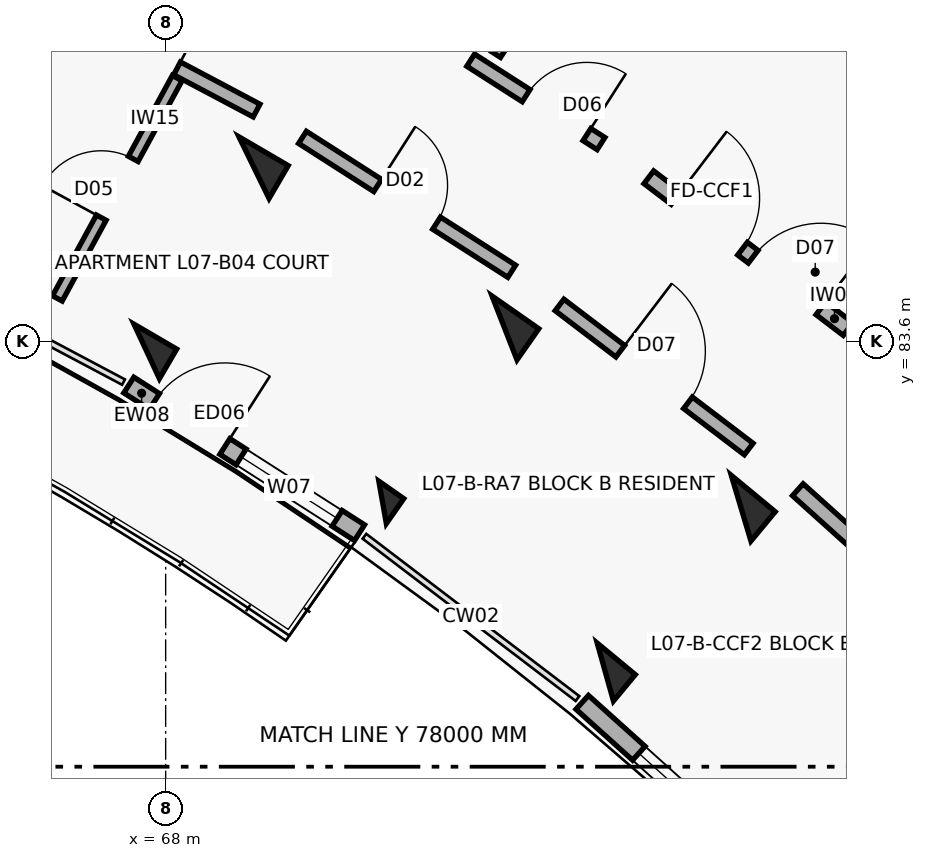
"""IFC4 building model, lengths in metres.
Left out: names, types, materials, properties, quantities, classifications, styles, units other than length and angle.
Written with IfcOpenShell. Run it as: python <this file> out.ifc"""

import sys

from ifc_helpers import new_model, si_unit, direction, frame, frame_2d, origin, origin_2d, place, context, subcontext, project, spatial, rectangle, extrude, element, fill, save


model = new_model("IFC4")
c1 = context("Model", 3, precision=1e-05, world=origin(), true_north=direction((0.0, 1.0)))
c2 = subcontext(c1, "Body", "Model", "MODEL_VIEW")
j1 = project(units=[si_unit("LENGTHUNIT", "METRE"), si_unit("PLANEANGLEUNIT", "RADIAN")], contexts=[c1])
p1 = place(None, origin())
s1 = spatial("IfcSite", under=j1, at=p1, CompositionType="ELEMENT")
p2 = place(p1, origin())
s2 = spatial("IfcBuilding", under=s1, at=p2, CompositionType="ELEMENT")
p3 = place(p2, frame((0.0, 0.0, 23.6)))
s3 = spatial("IfcBuildingStorey", under=s2, at=p3, CompositionType="ELEMENT", Elevation=23.6)
p4 = place(p3, frame((67.751, 83.464, 0.0), z_axis=(0.0, 0.0, 1.0), x_axis=(0.504226211181, 0.863571611366, 0.0)))
e1 = element("IfcColumn", 1, at=p4, inside=s3, PredefinedType="COLUMN", context=c2, shape_type="SweptSolid", body=[
    extrude(rectangle(XDim=0.45, YDim=0.65, at=origin_2d()), origin(), (0.0, 0.0, 1.0), 3.1),
])
p5 = place(p3, frame((69.163, 85.882, 0.0), z_axis=(0.0, 0.0, 1.0), x_axis=(0.504226211181, 0.863571611366, 0.0)))
e2 = element("IfcColumn", 2, at=p5, inside=s3, PredefinedType="COLUMN", context=c2, shape_type="SweptSolid", body=[
    extrude(rectangle(XDim=0.5, YDim=0.75, at=origin_2d()), origin(), (0.0, 0.0, 1.0), 3.1),
])
p6 = place(p3, frame((70.854, 81.478, 0.0), z_axis=(0.0, 0.0, 1.0), x_axis=(0.573004420611, 0.819552276527, 0.0)))
e3 = element("IfcColumn", 3, at=p6, inside=s3, PredefinedType="COLUMN", context=c2, shape_type="SweptSolid", body=[
    extrude(rectangle(XDim=0.4, YDim=0.4, at=origin_2d()), origin(), (0.0, 0.0, 1.0), 3.1),
])
p7 = place(p3, frame((72.458, 83.773, 0.0), z_axis=(0.0, 0.0, 1.0), x_axis=(0.573004420611, 0.819552276527, 0.0)))
e4 = element("IfcColumn", 4, at=p7, inside=s3, PredefinedType="COLUMN", context=c2, shape_type="SweptSolid", body=[
    extrude(rectangle(XDim=0.5, YDim=0.75, at=origin_2d()), origin(), (0.0, 0.0, 1.0), 3.1),
])
p8 = place(p3, frame((73.785, 79.245, 0.0), z_axis=(0.0, 0.0, 1.0), x_axis=(0.637961754089, 0.770068049148, 0.0)))
e5 = element("IfcColumn", 5, at=p8, inside=s3, PredefinedType="COLUMN", context=c2, shape_type="SweptSolid", body=[
    extrude(rectangle(XDim=0.45, YDim=0.65, at=origin_2d()), origin(), (0.0, 0.0, 1.0), 3.1),
])
p9 = place(p3, frame((75.571, 81.402, 0.0), z_axis=(0.0, 0.0, 1.0), x_axis=(0.637961754089, 0.770068049148, 0.0)))
e6 = element("IfcColumn", 6, at=p9, inside=s3, PredefinedType="COLUMN", context=c2, shape_type="SweptSolid", body=[
    extrude(rectangle(XDim=0.5, YDim=0.75, at=origin_2d()), origin(), (0.0, 0.0, 1.0), 3.1),
])
p10 = place(p3, frame((67.515, 83.022, 0.0), z_axis=(0.0, 0.0, 1.0), x_axis=(0.84225540507, -0.539078688718, 0.0)))
e7 = element("IfcWall", 7, at=p10, inside=s3, PredefinedType="SOLIDWALL", context=c2, shape_type="SweptSolid", body=[
    extrude(rectangle(XDim=3.604, YDim=0.245, at=frame_2d((1.802, 0.0))), origin(), (0.0, 0.0, 1.0), 2.25),
])
p11 = place(p10, frame((0.4, 0.0, 0.0)))
e8 = element("IfcOpeningElement", 8, at=p11, cuts=e7, PredefinedType="OPENING", context=c2, shape_type="SweptSolid", body=[
    extrude(rectangle(XDim=1.1, YDim=2.15, at=frame_2d((0.55, 1.075))), frame((0.0, 0.133, 0.0), z_axis=(0.0, -1.0, 0.0), x_axis=(1.0, 0.0, 0.0)), (0.0, 0.0, 1.0), 0.265),
])
p12 = place(p10, frame((1.754, 0.0, 0.35)))
e9 = element("IfcOpeningElement", 9, at=p12, cuts=e7, PredefinedType="OPENING", context=c2, shape_type="SweptSolid", body=[
    extrude(rectangle(XDim=1.5, YDim=1.65, at=frame_2d((0.75, 0.825))), frame((0.0, 0.133, 0.0), z_axis=(0.0, -1.0, 0.0), x_axis=(1.0, 0.0, 0.0)), (0.0, 0.0, 1.0), 0.265),
])
p13 = place(p3, frame((73.481, 78.847, 0.0), z_axis=(0.0, 0.0, 1.0), x_axis=(0.743385092197, -0.668863666751, 0.0)))
e10 = element("IfcWall", 10, at=p13, inside=s3, PredefinedType="SOLIDWALL", context=c2, shape_type="SweptSolid", body=[
    extrude(rectangle(XDim=3.604, YDim=0.245, at=frame_2d((1.802, 0.0))), origin(), (0.0, 0.0, 1.0), 2.25),
])
p14 = place(p13, frame((1.002, 0.0, 0.32)))
e11 = element("IfcOpeningElement", 11, at=p14, cuts=e10, PredefinedType="OPENING", context=c2, shape_type="SweptSolid", body=[
    extrude(rectangle(XDim=1.6, YDim=1.5, at=frame_2d((0.8, 0.75))), frame((0.0, 0.133, 0.0), z_axis=(0.0, -1.0, 0.0), x_axis=(1.0, 0.0, 0.0)), (0.0, 0.0, 1.0), 0.265),
])
p15 = place(p3, frame((66.309, 88.165, 0.0), z_axis=(0.0, 0.0, 1.0), x_axis=(0.883444301944, -0.468536194293, 0.0)))
e12 = element("IfcWall", 12, at=p15, inside=s3, PredefinedType="SOLIDWALL", context=c2, shape_type="SweptSolid", body=[
    extrude(rectangle(XDim=3.269, YDim=0.19, at=frame_2d((1.634, 0.0))), origin(), (0.0, 0.0, 1.0), 2.08),
])
p16 = place(p15, frame((1.184, 0.0, 0.0)))
e13 = element("IfcOpeningElement", 13, at=p16, cuts=e12, PredefinedType="OPENING", context=c2, shape_type="SweptSolid", body=[
    extrude(rectangle(XDim=0.9, YDim=2.1, at=frame_2d((0.45, 1.05))), frame((0.0, 0.105, 0.0), z_axis=(0.0, -1.0, 0.0), x_axis=(1.0, 0.0, 0.0)), (0.0, 0.0, 1.0), 0.21),
])
p17 = place(p3, frame((66.575, 84.162, 0.0), z_axis=(0.0, 0.0, 1.0), x_axis=(0.477841058477, 0.878446311868, 0.0)))
e14 = element("IfcWall", 14, at=p17, inside=s3, PredefinedType="PARTITIONING", context=c2, shape_type="SweptSolid", body=[
    extrude(rectangle(XDim=3.3, YDim=0.145, at=frame_2d((1.65, 0.0))), origin(), (0.0, 0.0, 1.0), 2.08),
])
p18 = place(p17, frame((1.21, 0.0, 0.0)))
e15 = element("IfcOpeningElement", 15, at=p18, cuts=e14, PredefinedType="OPENING", context=c2, shape_type="SweptSolid", body=[
    extrude(rectangle(XDim=0.88, YDim=2.1, at=frame_2d((0.44, 1.05))), frame((0.0, 0.083, 0.0), z_axis=(0.0, -1.0, 0.0), x_axis=(1.0, 0.0, 0.0)), (0.0, 0.0, 1.0), 0.165),
])
p19 = place(p3, frame((70.834, 88.051, 0.0), z_axis=(0.0, 0.0, 1.0), x_axis=(0.842257205985, -0.539075874963, 0.0)))
e16 = element("IfcWall", 16, at=p19, inside=s3, PredefinedType="SOLIDWALL", context=c2, shape_type="SweptSolid", body=[
    extrude(rectangle(XDim=3.436, YDim=0.19, at=frame_2d((1.718, 0.0))), origin(), (0.0, 0.0, 1.0), 2.08),
])
p20 = place(p19, frame((0.28, 0.0, 0.0)))
e17 = element("IfcOpeningElement", 17, at=p20, cuts=e16, PredefinedType="OPENING", context=c2, shape_type="SweptSolid", body=[
    extrude(rectangle(XDim=1.12, YDim=2.15, at=frame_2d((0.56, 1.075))), frame((0.0, 0.105, 0.0), z_axis=(0.0, -1.0, 0.0), x_axis=(1.0, 0.0, 0.0)), (0.0, 0.0, 1.0), 0.21),
])
p21 = place(p19, frame((2.266, 0.0, 0.0)))
e18 = element("IfcOpeningElement", 18, at=p21, cuts=e16, PredefinedType="OPENING", context=c2, shape_type="SweptSolid", body=[
    extrude(rectangle(XDim=0.95, YDim=2.1, at=frame_2d((0.475, 1.05))), frame((0.0, 0.105, 0.0), z_axis=(0.0, -1.0, 0.0), x_axis=(1.0, 0.0, 0.0)), (0.0, 0.0, 1.0), 0.21),
])
p22 = place(p3, frame((69.8, 86.281, 0.0), z_axis=(0.0, 0.0, 1.0), x_axis=(0.842225276846, -0.539125758095, 0.0)))
e19 = element("IfcWall", 19, at=p22, inside=s3, PredefinedType="SOLIDWALL", context=c2, shape_type="SweptSolid", body=[
    extrude(rectangle(XDim=3.269, YDim=0.19, at=frame_2d((1.634, 0.0))), origin(), (0.0, 0.0, 1.0), 2.08),
])
p23 = place(p22, frame((1.174, 0.0, 0.0)))
e20 = element("IfcOpeningElement", 20, at=p23, cuts=e19, PredefinedType="OPENING", context=c2, shape_type="SweptSolid", body=[
    extrude(rectangle(XDim=0.92, YDim=2.1, at=frame_2d((0.46, 1.05))), frame((0.0, 0.105, 0.0), z_axis=(0.0, -1.0, 0.0), x_axis=(1.0, 0.0, 0.0)), (0.0, 0.0, 1.0), 0.21),
])
p24 = place(p3, frame((72.347, 87.37, 0.0), z_axis=(0.0, 0.0, 1.0), x_axis=(0.537777309481, 0.843086926365, 0.0)))
e21 = element("IfcWall", 21, at=p24, inside=s3, PredefinedType="PARTITIONING", context=c2, shape_type="SweptSolid", body=[
    extrude(rectangle(XDim=7.95, YDim=0.14, at=frame_2d((3.975, 0.0))), origin(), (0.0, 0.0, 1.0), 2.08),
])
p25 = place(p24, frame((6.05, 0.0, 0.0)))
e22 = element("IfcOpeningElement", 22, at=p25, cuts=e21, PredefinedType="OPENING", context=c2, shape_type="SweptSolid", body=[
    extrude(rectangle(XDim=0.92, YDim=2.1, at=frame_2d((0.46, 1.05))), frame((0.0, 0.08, 0.0), z_axis=(0.0, -1.0, 0.0), x_axis=(1.0, 0.0, 0.0)), (0.0, 0.0, 1.0), 0.16),
])
p26 = place(p3, frame((74.357, 85.756, 0.0), z_axis=(0.0, 0.0, 1.0), x_axis=(0.795498026433, -0.605956178235, 0.0)))
e23 = element("IfcWall", 23, at=p26, inside=s3, PredefinedType="SOLIDWALL", context=c2, shape_type="SweptSolid", body=[
    extrude(rectangle(XDim=3.296, YDim=0.21, at=frame_2d((1.648, 0.0))), origin(), (0.0, 0.0, 1.0), 2.08),
])
p27 = place(p26, frame((0.45, 0.0, 0.0)))
e24 = element("IfcOpeningElement", 24, at=p27, cuts=e23, PredefinedType="OPENING", context=c2, shape_type="SweptSolid", body=[
    extrude(rectangle(XDim=1.1, YDim=2.15, at=frame_2d((0.55, 1.075))), frame((0.0, 0.115, 0.0), z_axis=(0.0, -1.0, 0.0), x_axis=(1.0, 0.0, 0.0)), (0.0, 0.0, 1.0), 0.23),
])
p28 = place(p26, frame((1.726, 0.0, 0.0)))
e25 = element("IfcOpeningElement", 25, at=p28, cuts=e23, PredefinedType="OPENING", context=c2, shape_type="SweptSolid", body=[
    extrude(rectangle(XDim=1.12, YDim=2.15, at=frame_2d((0.56, 1.075))), frame((0.0, 0.115, 0.0), z_axis=(0.0, -1.0, 0.0), x_axis=(1.0, 0.0, 0.0)), (0.0, 0.0, 1.0), 0.23),
])
p29 = place(p3, frame((73.182, 84.076, 0.0), z_axis=(0.0, 0.0, 1.0), x_axis=(0.795501577908, -0.605951515838, 0.0)))
e26 = element("IfcWall", 26, at=p29, inside=s3, PredefinedType="SOLIDWALL", context=c2, shape_type="SweptSolid", body=[
    extrude(rectangle(XDim=3.129, YDim=0.19, at=frame_2d((1.564, 0.0))), origin(), (0.0, 0.0, 1.0), 2.08),
])
p30 = place(p29, frame((1.004, 0.0, 0.0)))
e27 = element("IfcOpeningElement", 27, at=p30, cuts=e26, PredefinedType="OPENING", context=c2, shape_type="SweptSolid", body=[
    extrude(rectangle(XDim=1.12, YDim=2.15, at=frame_2d((0.56, 1.075))), frame((0.0, 0.105, 0.0), z_axis=(0.0, -1.0, 0.0), x_axis=(1.0, 0.0, 0.0)), (0.0, 0.0, 1.0), 0.21),
])
p31 = place(p3, frame((76.317, 81.644, 0.0), z_axis=(0.0, 0.0, 1.0), x_axis=(0.743387266925, -0.668861249718, 0.0)))
e28 = element("IfcWall", 28, at=p31, inside=s3, PredefinedType="SOLIDWALL", context=c2, shape_type="SweptSolid", body=[
    extrude(rectangle(XDim=3.128, YDim=0.21, at=frame_2d((1.564, 0.0))), origin(), (0.0, 0.0, 1.0), 2.08),
])
p32 = place(p31, frame((1.014, 0.0, 0.0)))
e29 = element("IfcOpeningElement", 29, at=p32, cuts=e28, PredefinedType="OPENING", context=c2, shape_type="SweptSolid", body=[
    extrude(rectangle(XDim=1.1, YDim=2.15, at=frame_2d((0.55, 1.075))), frame((0.0, 0.115, 0.0), z_axis=(0.0, -1.0, 0.0), x_axis=(1.0, 0.0, 0.0)), (0.0, 0.0, 1.0), 0.23),
])
p33 = place(p11, origin())
e30 = element("IfcDoor", 30, at=p33, inside=s3, OperationType="SINGLE_SWING_RIGHT", PredefinedType="DOOR", context=c2, shape_type="SweptSolid", body=[
    extrude(rectangle(XDim=1.1, YDim=2.15, at=frame_2d((0.55, 1.075))), frame((0.0, 0.025, 0.0), z_axis=(0.0, -1.0, 0.0), x_axis=(1.0, 0.0, 0.0)), (0.0, 0.0, 1.0), 0.05),
])
fill(e8, e30)
p34 = place(p12, origin())
e31 = element("IfcWindow", 31, at=p34, inside=s3, PartitioningType="DOUBLE_PANEL_VERTICAL", PredefinedType="WINDOW", context=c2, shape_type="SweptSolid", body=[
    extrude(rectangle(XDim=1.5, YDim=1.65, at=frame_2d((0.75, 0.825))), frame((0.0, 0.03, 0.0), z_axis=(0.0, -1.0, 0.0), x_axis=(1.0, 0.0, 0.0)), (0.0, 0.0, 1.0), 0.06),
])
fill(e9, e31)
p35 = place(p14, origin())
e32 = element("IfcWindow", 32, at=p35, inside=s3, PartitioningType="DOUBLE_PANEL_VERTICAL", PredefinedType="WINDOW", context=c2, shape_type="SweptSolid", body=[
    extrude(rectangle(XDim=1.6, YDim=1.5, at=frame_2d((0.8, 0.75))), frame((0.0, 0.03, 0.0), z_axis=(0.0, -1.0, 0.0), x_axis=(1.0, 0.0, 0.0)), (0.0, 0.0, 1.0), 0.06),
])
fill(e11, e32)
p36 = place(p16, origin())
e33 = element("IfcDoor", 33, at=p36, inside=s3, OperationType="SINGLE_SWING_RIGHT", PredefinedType="DOOR", context=c2, shape_type="SweptSolid", body=[
    extrude(rectangle(XDim=0.9, YDim=2.1, at=frame_2d((0.45, 1.05))), frame((0.0, 0.025, 0.0), z_axis=(0.0, -1.0, 0.0), x_axis=(1.0, 0.0, 0.0)), (0.0, 0.0, 1.0), 0.05),
])
fill(e13, e33)
p37 = place(p18, origin())
e34 = element("IfcDoor", 34, at=p37, inside=s3, OperationType="SINGLE_SWING_LEFT", PredefinedType="DOOR", context=c2, shape_type="SweptSolid", body=[
    extrude(rectangle(XDim=0.88, YDim=2.1, at=frame_2d((0.44, 1.05))), frame((0.0, 0.025, 0.0), z_axis=(0.0, -1.0, 0.0), x_axis=(1.0, 0.0, 0.0)), (0.0, 0.0, 1.0), 0.05),
])
fill(e15, e34)
p38 = place(p20, origin())
e35 = element("IfcDoor", 35, at=p38, inside=s3, OperationType="SINGLE_SWING_LEFT", PredefinedType="DOOR", context=c2, shape_type="SweptSolid", body=[
    extrude(rectangle(XDim=1.12, YDim=2.15, at=frame_2d((0.56, 1.075))), frame((0.0, 0.025, 0.0), z_axis=(0.0, -1.0, 0.0), x_axis=(1.0, 0.0, 0.0)), (0.0, 0.0, 1.0), 0.05),
])
fill(e17, e35)
p39 = place(p21, origin())
e36 = element("IfcDoor", 36, at=p39, inside=s3, OperationType="SINGLE_SWING_RIGHT", PredefinedType="DOOR", context=c2, shape_type="SweptSolid", body=[
    extrude(rectangle(XDim=0.95, YDim=2.1, at=frame_2d((0.475, 1.05))), frame((0.0, 0.025, 0.0), z_axis=(0.0, -1.0, 0.0), x_axis=(1.0, 0.0, 0.0)), (0.0, 0.0, 1.0), 0.05),
])
fill(e18, e36)
p40 = place(p23, origin())
e37 = element("IfcDoor", 37, at=p40, inside=s3, OperationType="SINGLE_SWING_LEFT", PredefinedType="DOOR", context=c2, shape_type="SweptSolid", body=[
    extrude(rectangle(XDim=0.92, YDim=2.1, at=frame_2d((0.46, 1.05))), frame((0.0, 0.025, 0.0), z_axis=(0.0, -1.0, 0.0), x_axis=(1.0, 0.0, 0.0)), (0.0, 0.0, 1.0), 0.05),
])
fill(e20, e37)
p41 = place(p27, origin())
e38 = element("IfcDoor", 38, at=p41, inside=s3, OperationType="SINGLE_SWING_LEFT", PredefinedType="DOOR", context=c2, shape_type="SweptSolid", body=[
    extrude(rectangle(XDim=1.1, YDim=2.15, at=frame_2d((0.55, 1.075))), frame((0.0, 0.025, 0.0), z_axis=(0.0, -1.0, 0.0), x_axis=(1.0, 0.0, 0.0)), (0.0, 0.0, 1.0), 0.05),
])
fill(e24, e38)
p42 = place(p28, origin())
e39 = element("IfcDoor", 39, at=p42, inside=s3, OperationType="SINGLE_SWING_RIGHT", PredefinedType="DOOR", context=c2, shape_type="SweptSolid", body=[
    extrude(rectangle(XDim=1.12, YDim=2.15, at=frame_2d((0.56, 1.075))), frame((0.0, 0.025, 0.0), z_axis=(0.0, -1.0, 0.0), x_axis=(1.0, 0.0, 0.0)), (0.0, 0.0, 1.0), 0.05),
])
fill(e25, e39)
p43 = place(p30, origin())
e40 = element("IfcDoor", 40, at=p43, inside=s3, OperationType="SINGLE_SWING_LEFT", PredefinedType="DOOR", context=c2, shape_type="SweptSolid", body=[
    extrude(rectangle(XDim=1.12, YDim=2.15, at=frame_2d((0.56, 1.075))), frame((0.0, 0.025, 0.0), z_axis=(0.0, -1.0, 0.0), x_axis=(1.0, 0.0, 0.0)), (0.0, 0.0, 1.0), 0.05),
])
fill(e27, e40)
save(model, sys.argv[1])
